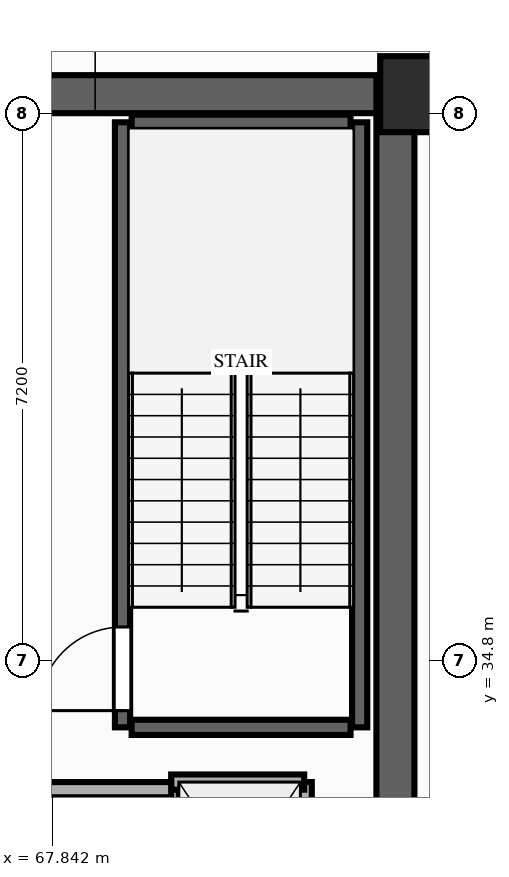
"""IFC4 building model, lengths in metres.
Left out: names, types, materials, properties, quantities, classifications, styles, units other than length and angle.
Written with IfcOpenShell. Run it as: python <this file> out.ifc"""

import sys

from ifc_helpers import new_model, si_unit, direction, frame, frame_2d, origin, origin_2d, place, context, subcontext, project, spatial, rectangle, extrude, element, fill, save


model = new_model("IFC4")
c1 = context("Model", 3, precision=1e-05, world=origin(), true_north=direction((0.0, 1.0)))
c2 = subcontext(c1, "Body", "Model", "MODEL_VIEW")
j1 = project(units=[si_unit("LENGTHUNIT", "METRE"), si_unit("PLANEANGLEUNIT", "RADIAN")], contexts=[c1])
p1 = place(None, origin())
s1 = spatial("IfcSite", under=j1, at=p1, CompositionType="ELEMENT")
p2 = place(p1, origin())
s2 = spatial("IfcBuilding", under=s1, at=p2, CompositionType="ELEMENT")
p3 = place(p2, frame((0.0, 0.0, 79.4)))
s3 = spatial("IfcBuildingStorey", under=s2, at=p3, CompositionType="ELEMENT", Elevation=79.4)
p4 = place(p3, frame((72.65, 42.25, 0.0), z_axis=(0.0, 0.0, 1.0), x_axis=(1.0, 0.0, 0.0)))
e1 = element("IfcColumn", 1, at=p4, inside=s3, PredefinedType="COLUMN", context=c2, shape_type="SweptSolid", body=[
    extrude(rectangle(XDim=1.0, YDim=1.0, at=origin_2d()), origin(), (0.0, 0.0, 1.0), 4.0),
])
p5 = place(p3, frame((72.35, 22.0, 0.0), z_axis=(0.0, 0.0, 1.0), x_axis=(0.0, 1.0, 0.0)))
e2 = element("IfcWall", 2, at=p5, inside=s3, PredefinedType="SHEAR", context=c2, shape_type="SweptSolid", body=[
    extrude(rectangle(XDim=20.25, YDim=0.5, at=frame_2d((10.125, 0.0))), origin(), (0.0, 0.0, 1.0), 3.82),
])
p6 = place(p3, frame((64.6, 42.25, 0.0), z_axis=(0.0, 0.0, 1.0), x_axis=(1.0, 0.0, 0.0)))
e3 = element("IfcWall", 3, at=p6, inside=s3, PredefinedType="SHEAR", context=c2, shape_type="SweptSolid", body=[
    extrude(rectangle(XDim=7.5, YDim=0.5, at=frame_2d((3.75, 0.0))), origin(), (0.0, 0.0, 1.0), 3.82),
])
p7 = place(p3, frame((68.76, 33.92, 0.0), z_axis=(0.0, 0.0, 1.0), x_axis=(0.0, 1.0, 0.0)))
e4 = element("IfcWall", 4, at=p7, inside=s3, PredefinedType="SHEAR", context=c2, shape_type="SweptSolid", body=[
    extrude(rectangle(XDim=7.96, YDim=0.2, at=frame_2d((3.98, 0.0))), origin(), (0.0, 0.0, 1.0), 3.82),
])
p8 = place(p7, frame((0.22, 0.0, 0.0)))
e5 = element("IfcOpeningElement", 5, at=p8, cuts=e4, PredefinedType="OPENING", context=c2, shape_type="SweptSolid", body=[
    extrude(rectangle(XDim=1.1, YDim=2.15, at=frame_2d((0.55, 1.075))), frame((0.0, 0.11, 0.0), z_axis=(0.0, -1.0, 0.0), x_axis=(1.0, 0.0, 0.0)), (0.0, 0.0, 1.0), 0.22),
])
p9 = place(p3, frame((71.88, 33.92, 0.0), z_axis=(0.0, 0.0, 1.0), x_axis=(0.0, 1.0, 0.0)))
e6 = element("IfcWall", 6, at=p9, inside=s3, PredefinedType="SHEAR", context=c2, shape_type="SweptSolid", body=[
    extrude(rectangle(XDim=7.96, YDim=0.2, at=frame_2d((3.98, 0.0))), origin(), (0.0, 0.0, 1.0), 3.82),
])
for number, where, z_axis, x_axis in (
    (7, (68.88, 41.88, 0.0), (0.0, 0.0, 1.0), (1.0, 0.0, 0.0)),
    (8, (68.88, 33.92, 0.0), (0.0, 0.0, 1.0), (1.0, 0.0, 0.0)),
):
    element("IfcWall", number, at=place(p3, frame(where, z_axis=z_axis, x_axis=x_axis)), inside=s3, PredefinedType="SHEAR", context=c2, shape_type="SweptSolid", body=[
        extrude(rectangle(XDim=2.88, YDim=0.2, at=frame_2d((1.44, 0.0))), origin(), (0.0, 0.0, 1.0), 3.82),
    ])
p10 = place(p3, frame((69.4, 30.75, 0.0), z_axis=(0.0, 0.0, 1.0), x_axis=(0.0, 1.0, 0.0)))
e9 = element("IfcWall", 9, at=p10, inside=s3, PredefinedType="MOVABLE", context=c2, shape_type="SweptSolid", body=[
    extrude(rectangle(XDim=2.45, YDim=0.2, at=frame_2d((1.225, 0.0))), origin(), (0.0, 0.0, 1.0), 3.82),
])
p11 = place(p10, frame((0.65, 0.0, 0.0)))
e10 = element("IfcOpeningElement", 10, at=p11, cuts=e9, PredefinedType="OPENING", context=c2, shape_type="SweptSolid", body=[
    extrude(rectangle(XDim=1.05, YDim=2.15, at=frame_2d((0.525, 1.075))), frame((0.0, 0.11, 0.0), z_axis=(0.0, -1.0, 0.0), x_axis=(1.0, 0.0, 0.0)), (0.0, 0.0, 1.0), 0.22),
])
p12 = place(p3, frame((71.15, 30.75, 0.0), z_axis=(0.0, 0.0, 1.0), x_axis=(0.0, 1.0, 0.0)))
e11 = element("IfcWall", 11, at=p12, inside=s3, PredefinedType="MOVABLE", context=c2, shape_type="SweptSolid", body=[
    extrude(rectangle(XDim=2.45, YDim=0.2, at=frame_2d((1.225, 0.0))), origin(), (0.0, 0.0, 1.0), 3.82),
])
p13 = place(p3, frame((69.4, 33.2, 0.0), z_axis=(0.0, 0.0, 1.0), x_axis=(1.0, 0.0, 0.0)))
e12 = element("IfcWall", 12, at=p13, inside=s3, PredefinedType="MOVABLE", context=c2, shape_type="SweptSolid", body=[
    extrude(rectangle(XDim=1.75, YDim=0.2, at=frame_2d((0.875, 0.0))), origin(), (0.0, 0.0, 1.0), 3.82),
])
p14 = place(p3, frame((65.8, 33.1, 0.0), z_axis=(0.0, 0.0, 1.0), x_axis=(1.0, 0.0, 0.0)))
e13 = element("IfcWall", 13, at=p14, inside=s3, PredefinedType="PARTITIONING", context=c2, shape_type="SweptSolid", body=[
    extrude(rectangle(XDim=3.6, YDim=0.2, at=frame_2d((1.8, 0.0))), origin(), (0.0, 0.0, 1.0), 3.82),
])
p15 = place(p8, origin())
e14 = element("IfcDoor", 14, at=p15, inside=s3, OperationType="SINGLE_SWING_LEFT", PredefinedType="DOOR", context=c2, shape_type="SweptSolid", body=[
    extrude(rectangle(XDim=1.1, YDim=2.15, at=frame_2d((0.55, 1.075))), frame((0.0, 0.025, 0.0), z_axis=(0.0, -1.0, 0.0), x_axis=(1.0, 0.0, 0.0)), (0.0, 0.0, 1.0), 0.05),
])
fill(e5, e14)
save(model, sys.argv[1])
